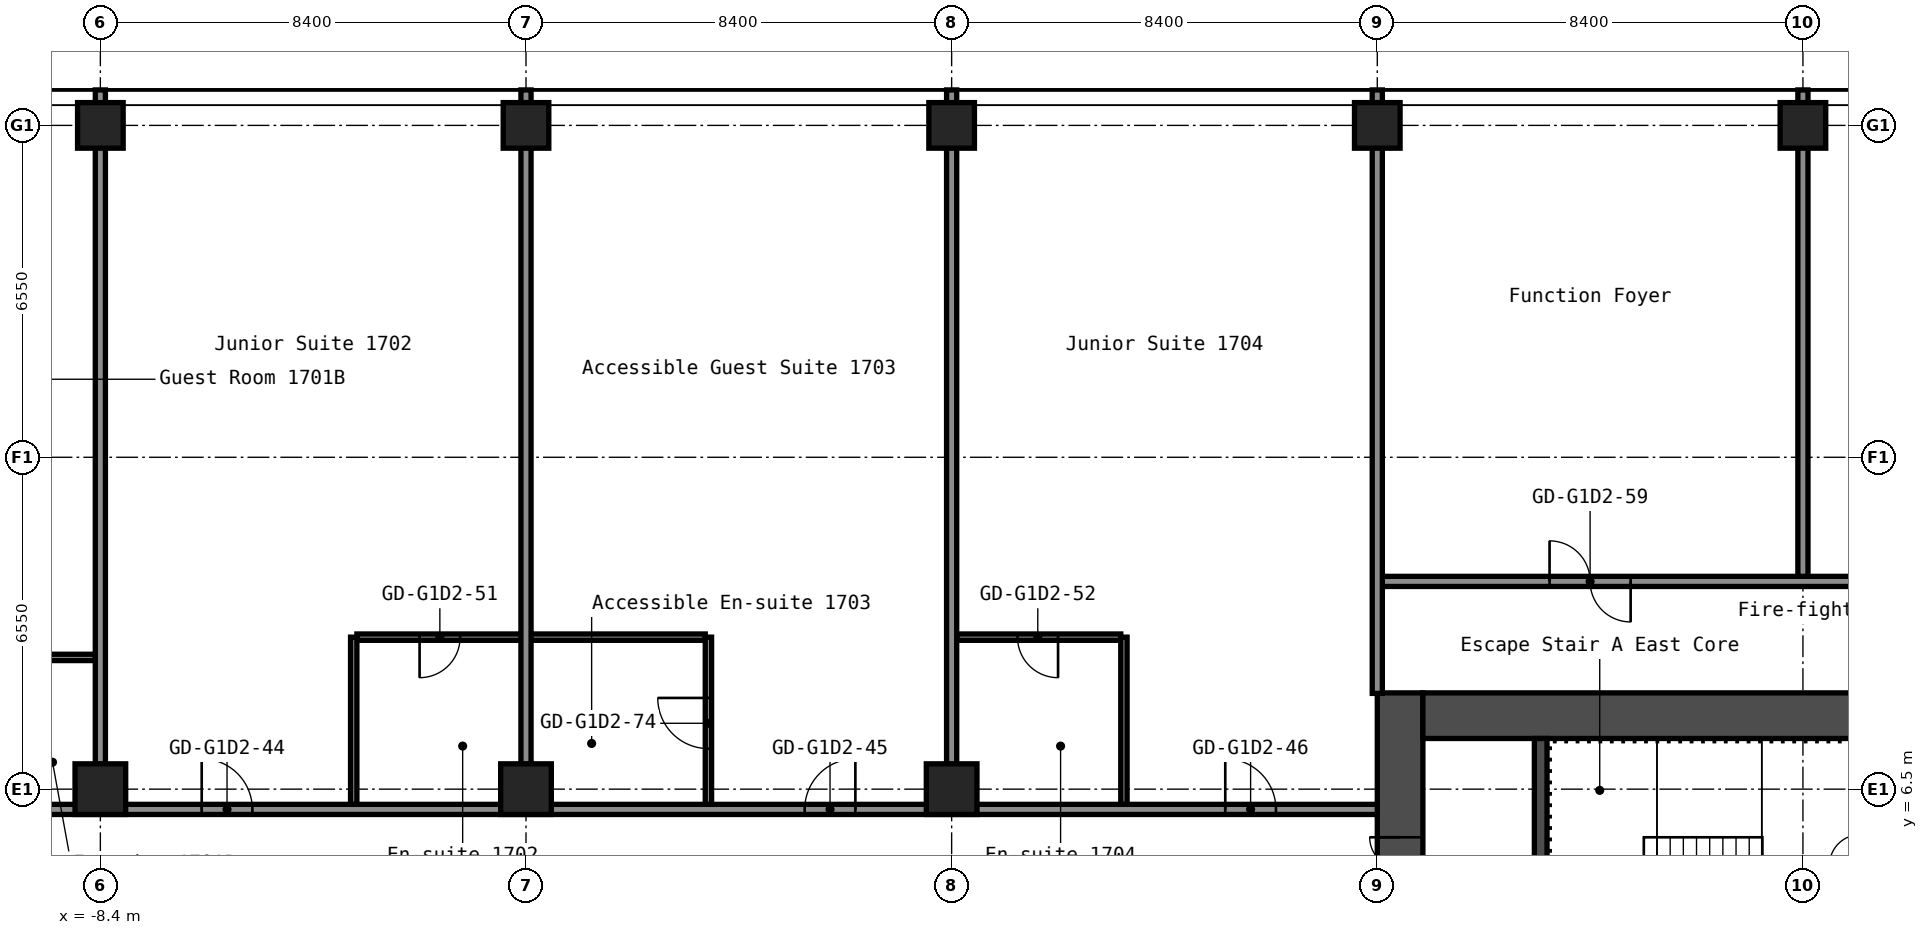
"""IFC4 building model, lengths in metres.
Left out: names, types, materials, properties, quantities, classifications, styles, units other than length and angle.
Written with IfcOpenShell. Run it as: python <this file> out.ifc"""

import sys

from ifc_helpers import new_model, si_unit, direction, frame, frame_2d, origin, origin_2d, place, context, subcontext, project, spatial, rectangle, hollow_rectangle, extrude, element, fill, save


model = new_model("IFC4")
c1 = context("Model", 3, precision=1e-05, world=origin(), true_north=direction((0.0, 1.0)))
c2 = subcontext(c1, "Body", "Model", "MODEL_VIEW")
j1 = project(units=[si_unit("LENGTHUNIT", "METRE"), si_unit("PLANEANGLEUNIT", "RADIAN")], contexts=[c1])
p1 = place(None, origin())
s1 = spatial("IfcSite", under=j1, at=p1, CompositionType="ELEMENT")
p2 = place(p1, origin())
s2 = spatial("IfcBuilding", under=s1, at=p2, CompositionType="ELEMENT")
p3 = place(p2, frame((0.0, 0.0, 61.4)))
s3 = spatial("IfcBuildingStorey", under=s2, at=p3, CompositionType="ELEMENT", Elevation=61.4)
p4 = place(p3, frame((-8.4, 6.5, 0.0), z_axis=(0.0, 0.0, 1.0), x_axis=(1.0, 0.0, 0.0)))
e1 = element("IfcColumn", 1, at=p4, inside=s3, PredefinedType="COLUMN", context=c2, shape_type="SweptSolid", body=[
    extrude(hollow_rectangle(XDim=1.0, YDim=1.0, WallThickness=0.04, at=origin_2d()), origin(), (0.0, 0.0, 1.0), 2.9),
])
p5 = place(p3, frame((-8.4, 19.6, 0.0), z_axis=(0.0, 0.0, 1.0), x_axis=(1.0, 0.0, 0.0)))
e2 = element("IfcColumn", 2, at=p5, inside=s3, PredefinedType="COLUMN", context=c2, shape_type="SweptSolid", body=[
    extrude(hollow_rectangle(XDim=0.9, YDim=0.9, WallThickness=0.036, at=origin_2d()), origin(), (0.0, 0.0, 1.0), 2.9),
])
p6 = place(p3, frame((0.0, 6.5, 0.0), z_axis=(0.0, 0.0, 1.0), x_axis=(1.0, 0.0, 0.0)))
e3 = element("IfcColumn", 3, at=p6, inside=s3, PredefinedType="COLUMN", context=c2, shape_type="SweptSolid", body=[
    extrude(hollow_rectangle(XDim=1.0, YDim=1.0, WallThickness=0.04, at=origin_2d()), origin(), (0.0, 0.0, 1.0), 2.9),
])
p7 = place(p3, frame((0.0, 19.6, 0.0), z_axis=(0.0, 0.0, 1.0), x_axis=(1.0, 0.0, 0.0)))
e4 = element("IfcColumn", 4, at=p7, inside=s3, PredefinedType="COLUMN", context=c2, shape_type="SweptSolid", body=[
    extrude(hollow_rectangle(XDim=0.9, YDim=0.9, WallThickness=0.036, at=origin_2d()), origin(), (0.0, 0.0, 1.0), 2.9),
])
p8 = place(p3, frame((8.4, 6.5, 0.0), z_axis=(0.0, 0.0, 1.0), x_axis=(1.0, 0.0, 0.0)))
e5 = element("IfcColumn", 5, at=p8, inside=s3, PredefinedType="COLUMN", context=c2, shape_type="SweptSolid", body=[
    extrude(hollow_rectangle(XDim=1.0, YDim=1.0, WallThickness=0.04, at=origin_2d()), origin(), (0.0, 0.0, 1.0), 2.9),
])
for number, where, z_axis, x_axis in (
    (6, (8.4, 19.6, 0.0), (0.0, 0.0, 1.0), (1.0, 0.0, 0.0)),
    (7, (16.8, 19.6, 0.0), (0.0, 0.0, 1.0), (1.0, 0.0, 0.0)),
    (8, (25.2, 19.6, 0.0), (0.0, 0.0, 1.0), (1.0, 0.0, 0.0)),
):
    element("IfcColumn", number, at=place(p3, frame(where, z_axis=z_axis, x_axis=x_axis)), inside=s3, PredefinedType="COLUMN", context=c2, shape_type="SweptSolid", body=[
        extrude(hollow_rectangle(XDim=0.9, YDim=0.9, WallThickness=0.036, at=origin_2d()), origin(), (0.0, 0.0, 1.0), 2.9),
    ])
p9 = place(p3, frame((17.25, -8.4, 0.0), z_axis=(0.0, 0.0, 1.0), x_axis=(0.0, 1.0, 0.0)))
e9 = element("IfcWall", 9, at=p9, inside=s3, PredefinedType="SHEAR", context=c2, shape_type="SweptSolid", body=[
    extrude(rectangle(XDim=16.8, YDim=0.9, at=frame_2d((8.4, 0.0))), origin(), (0.0, 0.0, 1.0), 2.9),
])
p10 = place(p9, frame((12.75, 0.0, 0.0)))
e10 = element("IfcOpeningElement", 10, at=p10, cuts=e9, PredefinedType="OPENING", context=c2, shape_type="SweptSolid", body=[
    extrude(rectangle(XDim=1.2, YDim=2.1, at=frame_2d((0.6, 1.05))), frame((0.0, 0.46, 0.0), z_axis=(0.0, -1.0, 0.0), x_axis=(1.0, 0.0, 0.0)), (0.0, 0.0, 1.0), 0.92),
])
p11 = place(p9, frame((2.85, 0.0, 0.0)))
e11 = element("IfcOpeningElement", 11, at=p11, cuts=e9, PredefinedType="OPENING", context=c2, shape_type="SweptSolid", body=[
    extrude(rectangle(XDim=1.2, YDim=2.1, at=frame_2d((0.6, 1.05))), frame((0.0, 0.46, 0.0), z_axis=(0.0, -1.0, 0.0), x_axis=(1.0, 0.0, 0.0)), (0.0, 0.0, 1.0), 0.92),
])
p12 = place(p3, frame((17.7, 7.95, 0.0), z_axis=(0.0, 0.0, 1.0), x_axis=(1.0, 0.0, 0.0)))
e12 = element("IfcWall", 12, at=p12, inside=s3, PredefinedType="SHEAR", context=c2, shape_type="SweptSolid", body=[
    extrude(rectangle(XDim=15.0, YDim=0.9, at=frame_2d((7.5, 0.0))), origin(), (0.0, 0.0, 1.0), 2.9),
])
p13 = place(p12, frame((10.4, 0.0, 0.0)))
e13 = element("IfcOpeningElement", 13, at=p13, cuts=e12, PredefinedType="OPENING", context=c2, shape_type="SweptSolid", body=[
    extrude(rectangle(XDim=1.2, YDim=2.1, at=frame_2d((0.6, 1.05))), frame((0.0, 0.46, 0.0), z_axis=(0.0, -1.0, 0.0), x_axis=(1.0, 0.0, 0.0)), (0.0, 0.0, 1.0), 0.92),
])
p14 = place(p12, frame((13.35, 0.0, 0.0)))
e14 = element("IfcOpeningElement", 14, at=p14, cuts=e12, PredefinedType="OPENING", context=c2, shape_type="SweptSolid", body=[
    extrude(rectangle(XDim=0.9, YDim=2.1, at=frame_2d((0.45, 1.05))), frame((0.0, 0.46, 0.0), z_axis=(0.0, -1.0, 0.0), x_axis=(1.0, 0.0, 0.0)), (0.0, 0.0, 1.0), 0.92),
])
p15 = place(p3, frame((20.025, 1.2, 0.0), z_axis=(0.0, 0.0, 1.0), x_axis=(0.0, 1.0, 0.0)))
e15 = element("IfcWall", 15, at=p15, inside=s3, PredefinedType="SHEAR", context=c2, shape_type="SweptSolid", body=[
    extrude(rectangle(XDim=6.3, YDim=0.25, at=frame_2d((3.15, 0.0))), origin(), (0.0, 0.0, 1.0), 2.9),
])
p16 = place(p3, frame((-16.8, 6.1, 0.0), z_axis=(0.0, 0.0, 1.0), x_axis=(1.0, 0.0, 0.0)))
e16 = element("IfcWall", 16, at=p16, inside=s3, PredefinedType="PARTITIONING", context=c2, shape_type="SweptSolid", body=[
    extrude(rectangle(XDim=33.6, YDim=0.2, at=frame_2d((16.8, 0.0))), origin(), (0.0, 0.0, 1.0), 2.9),
])
p17 = place(p16, frame((2.85, 0.0, 0.0)))
e17 = element("IfcOpeningElement", 17, at=p17, cuts=e16, PredefinedType="OPENING", context=c2, shape_type="SweptSolid", body=[
    extrude(rectangle(XDim=1.0, YDim=2.1, at=frame_2d((0.5, 1.05))), frame((0.0, 0.11, 0.0), z_axis=(0.0, -1.0, 0.0), x_axis=(1.0, 0.0, 0.0)), (0.0, 0.0, 1.0), 0.22),
])
p18 = place(p16, frame((4.55, 0.0, 0.0)))
e18 = element("IfcOpeningElement", 18, at=p18, cuts=e16, PredefinedType="OPENING", context=c2, shape_type="SweptSolid", body=[
    extrude(rectangle(XDim=1.0, YDim=2.1, at=frame_2d((0.5, 1.05))), frame((0.0, 0.11, 0.0), z_axis=(0.0, -1.0, 0.0), x_axis=(1.0, 0.0, 0.0)), (0.0, 0.0, 1.0), 0.22),
])
p19 = place(p16, frame((10.4, 0.0, 0.0)))
e19 = element("IfcOpeningElement", 19, at=p19, cuts=e16, PredefinedType="OPENING", context=c2, shape_type="SweptSolid", body=[
    extrude(rectangle(XDim=1.0, YDim=2.1, at=frame_2d((0.5, 1.05))), frame((0.0, 0.11, 0.0), z_axis=(0.0, -1.0, 0.0), x_axis=(1.0, 0.0, 0.0)), (0.0, 0.0, 1.0), 0.22),
])
p20 = place(p16, frame((22.3, 0.0, 0.0)))
e20 = element("IfcOpeningElement", 20, at=p20, cuts=e16, PredefinedType="OPENING", context=c2, shape_type="SweptSolid", body=[
    extrude(rectangle(XDim=1.0, YDim=2.1, at=frame_2d((0.5, 1.05))), frame((0.0, 0.11, 0.0), z_axis=(0.0, -1.0, 0.0), x_axis=(1.0, 0.0, 0.0)), (0.0, 0.0, 1.0), 0.22),
])
p21 = place(p16, frame((30.6, 0.0, 0.0)))
e21 = element("IfcOpeningElement", 21, at=p21, cuts=e16, PredefinedType="OPENING", context=c2, shape_type="SweptSolid", body=[
    extrude(rectangle(XDim=1.0, YDim=2.1, at=frame_2d((0.5, 1.05))), frame((0.0, 0.11, 0.0), z_axis=(0.0, -1.0, 0.0), x_axis=(1.0, 0.0, 0.0)), (0.0, 0.0, 1.0), 0.22),
])
p22 = place(p3, frame((-10.837, 9.1, 0.0), z_axis=(0.0, 0.0, 1.0), x_axis=(1.0, 0.0, 0.0)))
e22 = element("IfcWall", 22, at=p22, inside=s3, PredefinedType="PARTITIONING", context=c2, shape_type="SweptSolid", body=[
    extrude(rectangle(XDim=2.337, YDim=0.125, at=frame_2d((1.169, 0.0))), origin(), (0.0, 0.0, 1.0), 2.9),
])
p23 = place(p3, frame((-3.337, 9.5, 0.0), z_axis=(0.0, 0.0, 1.0), x_axis=(1.0, 0.0, 0.0)))
e23 = element("IfcWall", 23, at=p23, inside=s3, PredefinedType="PARTITIONING", context=c2, shape_type="SweptSolid", body=[
    extrude(rectangle(XDim=6.875, YDim=0.125, at=frame_2d((3.438, 0.0))), origin(), (0.0, 0.0, 1.0), 2.9),
])
p24 = place(p23, frame((1.238, 0.0, 0.0)))
e24 = element("IfcOpeningElement", 24, at=p24, cuts=e23, PredefinedType="OPENING", context=c2, shape_type="SweptSolid", body=[
    extrude(rectangle(XDim=0.8, YDim=2.1, at=frame_2d((0.4, 1.05))), frame((0.0, 0.073, 0.0), z_axis=(0.0, -1.0, 0.0), x_axis=(1.0, 0.0, 0.0)), (0.0, 0.0, 1.0), 0.145),
])
p25 = place(p3, frame((8.5, 9.5, 0.0), z_axis=(0.0, 0.0, 1.0), x_axis=(1.0, 0.0, 0.0)))
e25 = element("IfcWall", 25, at=p25, inside=s3, PredefinedType="PARTITIONING", context=c2, shape_type="SweptSolid", body=[
    extrude(rectangle(XDim=3.238, YDim=0.125, at=frame_2d((1.619, 0.0))), origin(), (0.0, 0.0, 1.0), 2.9),
])
p26 = place(p25, frame((1.2, 0.0, 0.0)))
e26 = element("IfcOpeningElement", 26, at=p26, cuts=e25, PredefinedType="OPENING", context=c2, shape_type="SweptSolid", body=[
    extrude(rectangle(XDim=0.8, YDim=2.1, at=frame_2d((0.4, 1.05))), frame((0.0, 0.073, 0.0), z_axis=(0.0, -1.0, 0.0), x_axis=(1.0, 0.0, 0.0)), (0.0, 0.0, 1.0), 0.145),
])
p27 = place(p3, frame((16.8, 10.6, 0.0), z_axis=(0.0, 0.0, 1.0), x_axis=(1.0, 0.0, 0.0)))
e27 = element("IfcWall", 27, at=p27, inside=s3, PredefinedType="PARTITIONING", context=c2, shape_type="SweptSolid", body=[
    extrude(rectangle(XDim=34.3, YDim=0.2, at=frame_2d((17.15, 0.0))), origin(), (0.0, 0.0, 1.0), 2.9),
])
p28 = place(p27, frame((3.4, 0.0, 0.0)))
e28 = element("IfcOpeningElement", 28, at=p28, cuts=e27, PredefinedType="OPENING", context=c2, shape_type="SweptSolid", body=[
    extrude(rectangle(XDim=1.6, YDim=2.1, at=frame_2d((0.8, 1.05))), frame((0.0, 0.11, 0.0), z_axis=(0.0, -1.0, 0.0), x_axis=(1.0, 0.0, 0.0)), (0.0, 0.0, 1.0), 0.22),
])
p29 = place(p27, frame((11.8, 0.0, 0.0)))
e29 = element("IfcOpeningElement", 29, at=p29, cuts=e27, PredefinedType="OPENING", context=c2, shape_type="SweptSolid", body=[
    extrude(rectangle(XDim=1.6, YDim=2.1, at=frame_2d((0.8, 1.05))), frame((0.0, 0.11, 0.0), z_axis=(0.0, -1.0, 0.0), x_axis=(1.0, 0.0, 0.0)), (0.0, 0.0, 1.0), 0.22),
])
p30 = place(p27, frame((20.2, 0.0, 0.0)))
e30 = element("IfcOpeningElement", 30, at=p30, cuts=e27, PredefinedType="OPENING", context=c2, shape_type="SweptSolid", body=[
    extrude(rectangle(XDim=1.6, YDim=2.1, at=frame_2d((0.8, 1.05))), frame((0.0, 0.11, 0.0), z_axis=(0.0, -1.0, 0.0), x_axis=(1.0, 0.0, 0.0)), (0.0, 0.0, 1.0), 0.22),
])
p31 = place(p27, frame((28.8, 0.0, 0.0)))
e31 = element("IfcOpeningElement", 31, at=p31, cuts=e27, PredefinedType="OPENING", context=c2, shape_type="SweptSolid", body=[
    extrude(rectangle(XDim=1.6, YDim=2.1, at=frame_2d((0.8, 1.05))), frame((0.0, 0.11, 0.0), z_axis=(0.0, -1.0, 0.0), x_axis=(1.0, 0.0, 0.0)), (0.0, 0.0, 1.0), 0.22),
])
p32 = place(p3, frame((-8.4, 6.99, 0.0), z_axis=(0.0, 0.0, 1.0), x_axis=(0.0, 1.0, 0.0)))
e32 = element("IfcWall", 32, at=p32, inside=s3, PredefinedType="PARTITIONING", context=c2, shape_type="SweptSolid", body=[
    extrude(rectangle(XDim=13.31, YDim=0.2, at=frame_2d((6.655, 0.0))), origin(), (0.0, 0.0, 1.0), 2.9),
])
p33 = place(p3, frame((-3.4, 6.2, 0.0), z_axis=(0.0, 0.0, 1.0), x_axis=(0.0, 1.0, 0.0)))
e33 = element("IfcWall", 33, at=p33, inside=s3, PredefinedType="PARTITIONING", context=c2, shape_type="SweptSolid", body=[
    extrude(rectangle(XDim=3.3, YDim=0.125, at=frame_2d((1.65, 0.0))), origin(), (0.0, 0.0, 1.0), 2.9),
])
p34 = place(p3, frame((0.0, 6.99, 0.0), z_axis=(0.0, 0.0, 1.0), x_axis=(0.0, 1.0, 0.0)))
e34 = element("IfcWall", 34, at=p34, inside=s3, PredefinedType="PARTITIONING", context=c2, shape_type="SweptSolid", body=[
    extrude(rectangle(XDim=13.31, YDim=0.2, at=frame_2d((6.655, 0.0))), origin(), (0.0, 0.0, 1.0), 2.9),
])
p35 = place(p3, frame((3.6, 6.2, 0.0), z_axis=(0.0, 0.0, 1.0), x_axis=(0.0, 1.0, 0.0)))
e35 = element("IfcWall", 35, at=p35, inside=s3, PredefinedType="PARTITIONING", context=c2, shape_type="SweptSolid", body=[
    extrude(rectangle(XDim=3.3, YDim=0.125, at=frame_2d((1.65, 0.0))), origin(), (0.0, 0.0, 1.0), 2.9),
])
p36 = place(p35, frame((1.1, 0.0, 0.0)))
e36 = element("IfcOpeningElement", 36, at=p36, cuts=e35, PredefinedType="OPENING", context=c2, shape_type="SweptSolid", body=[
    extrude(rectangle(XDim=1.0, YDim=2.1, at=frame_2d((0.5, 1.05))), frame((0.0, 0.073, 0.0), z_axis=(0.0, -1.0, 0.0), x_axis=(1.0, 0.0, 0.0)), (0.0, 0.0, 1.0), 0.145),
])
p37 = place(p3, frame((8.4, 6.99, 0.0), z_axis=(0.0, 0.0, 1.0), x_axis=(0.0, 1.0, 0.0)))
e37 = element("IfcWall", 37, at=p37, inside=s3, PredefinedType="PARTITIONING", context=c2, shape_type="SweptSolid", body=[
    extrude(rectangle(XDim=13.31, YDim=0.2, at=frame_2d((6.655, 0.0))), origin(), (0.0, 0.0, 1.0), 2.9),
])
p38 = place(p3, frame((11.8, 6.2, 0.0), z_axis=(0.0, 0.0, 1.0), x_axis=(0.0, 1.0, 0.0)))
e38 = element("IfcWall", 38, at=p38, inside=s3, PredefinedType="PARTITIONING", context=c2, shape_type="SweptSolid", body=[
    extrude(rectangle(XDim=3.3, YDim=0.125, at=frame_2d((1.65, 0.0))), origin(), (0.0, 0.0, 1.0), 2.9),
])
p39 = place(p3, frame((16.8, 8.39, 0.0), z_axis=(0.0, 0.0, 1.0), x_axis=(0.0, 1.0, 0.0)))
e39 = element("IfcWall", 39, at=p39, inside=s3, PredefinedType="PARTITIONING", context=c2, shape_type="SweptSolid", body=[
    extrude(rectangle(XDim=11.91, YDim=0.2, at=frame_2d((5.955, 0.0))), origin(), (0.0, 0.0, 1.0), 2.9),
])
p40 = place(p3, frame((25.2, 10.7, 0.0), z_axis=(0.0, 0.0, 1.0), x_axis=(0.0, 1.0, 0.0)))
e40 = element("IfcWall", 40, at=p40, inside=s3, PredefinedType="PARTITIONING", context=c2, shape_type="SweptSolid", body=[
    extrude(rectangle(XDim=9.6, YDim=0.2, at=frame_2d((4.8, 0.0))), origin(), (0.0, 0.0, 1.0), 2.9),
])
p41 = place(p10, origin())
e41 = element("IfcDoor", 41, at=p41, inside=s3, OperationType="DOUBLE_DOOR_SINGLE_SWING", PredefinedType="DOOR", context=c2, shape_type="SweptSolid", body=[
    extrude(rectangle(XDim=1.2, YDim=2.1, at=frame_2d((0.6, 1.05))), frame((0.0, 0.025, 0.0), z_axis=(0.0, -1.0, 0.0), x_axis=(1.0, 0.0, 0.0)), (0.0, 0.0, 1.0), 0.05),
])
fill(e10, e41)
p42 = place(p19, origin())
e42 = element("IfcDoor", 42, at=p42, inside=s3, OperationType="SINGLE_SWING_RIGHT", PredefinedType="DOOR", context=c2, shape_type="SweptSolid", body=[
    extrude(rectangle(XDim=1.0, YDim=2.1, at=frame_2d((0.5, 1.05))), frame((0.0, 0.025, 0.0), z_axis=(0.0, -1.0, 0.0), x_axis=(1.0, 0.0, 0.0)), (0.0, 0.0, 1.0), 0.05),
])
fill(e19, e42)
p43 = place(p20, origin())
e43 = element("IfcDoor", 43, at=p43, inside=s3, OperationType="SINGLE_SWING_LEFT", PredefinedType="DOOR", context=c2, shape_type="SweptSolid", body=[
    extrude(rectangle(XDim=1.0, YDim=2.1, at=frame_2d((0.5, 1.05))), frame((0.0, 0.025, 0.0), z_axis=(0.0, -1.0, 0.0), x_axis=(1.0, 0.0, 0.0)), (0.0, 0.0, 1.0), 0.05),
])
fill(e20, e43)
p44 = place(p21, origin())
e44 = element("IfcDoor", 44, at=p44, inside=s3, OperationType="SINGLE_SWING_RIGHT", PredefinedType="DOOR", context=c2, shape_type="SweptSolid", body=[
    extrude(rectangle(XDim=1.0, YDim=2.1, at=frame_2d((0.5, 1.05))), frame((0.0, 0.025, 0.0), z_axis=(0.0, -1.0, 0.0), x_axis=(1.0, 0.0, 0.0)), (0.0, 0.0, 1.0), 0.05),
])
fill(e21, e44)
p45 = place(p24, origin())
e45 = element("IfcDoor", 45, at=p45, inside=s3, OperationType="SINGLE_SWING_LEFT", PredefinedType="DOOR", context=c2, shape_type="SweptSolid", body=[
    extrude(rectangle(XDim=0.8, YDim=2.1, at=frame_2d((0.4, 1.05))), frame((0.0, 0.025, 0.0), z_axis=(0.0, -1.0, 0.0), x_axis=(1.0, 0.0, 0.0)), (0.0, 0.0, 1.0), 0.05),
])
fill(e24, e45)
p46 = place(p26, origin())
e46 = element("IfcDoor", 46, at=p46, inside=s3, OperationType="SINGLE_SWING_RIGHT", PredefinedType="DOOR", context=c2, shape_type="SweptSolid", body=[
    extrude(rectangle(XDim=0.8, YDim=2.1, at=frame_2d((0.4, 1.05))), frame((0.0, 0.025, 0.0), z_axis=(0.0, -1.0, 0.0), x_axis=(1.0, 0.0, 0.0)), (0.0, 0.0, 1.0), 0.05),
])
fill(e26, e46)
p47 = place(p28, origin())
e47 = element("IfcDoor", 47, at=p47, inside=s3, OperationType="DOUBLE_DOOR_SINGLE_SWING", PredefinedType="DOOR", context=c2, shape_type="SweptSolid", body=[
    extrude(rectangle(XDim=1.6, YDim=2.1, at=frame_2d((0.8, 1.05))), frame((0.0, 0.025, 0.0), z_axis=(0.0, -1.0, 0.0), x_axis=(1.0, 0.0, 0.0)), (0.0, 0.0, 1.0), 0.05),
])
fill(e28, e47)
p48 = place(p36, origin())
e48 = element("IfcDoor", 48, at=p48, inside=s3, OperationType="SINGLE_SWING_LEFT", PredefinedType="DOOR", context=c2, shape_type="SweptSolid", body=[
    extrude(rectangle(XDim=1.0, YDim=2.1, at=frame_2d((0.5, 1.05))), frame((0.0, 0.025, 0.0), z_axis=(0.0, -1.0, 0.0), x_axis=(1.0, 0.0, 0.0)), (0.0, 0.0, 1.0), 0.05),
])
fill(e36, e48)
save(model, sys.argv[1])
